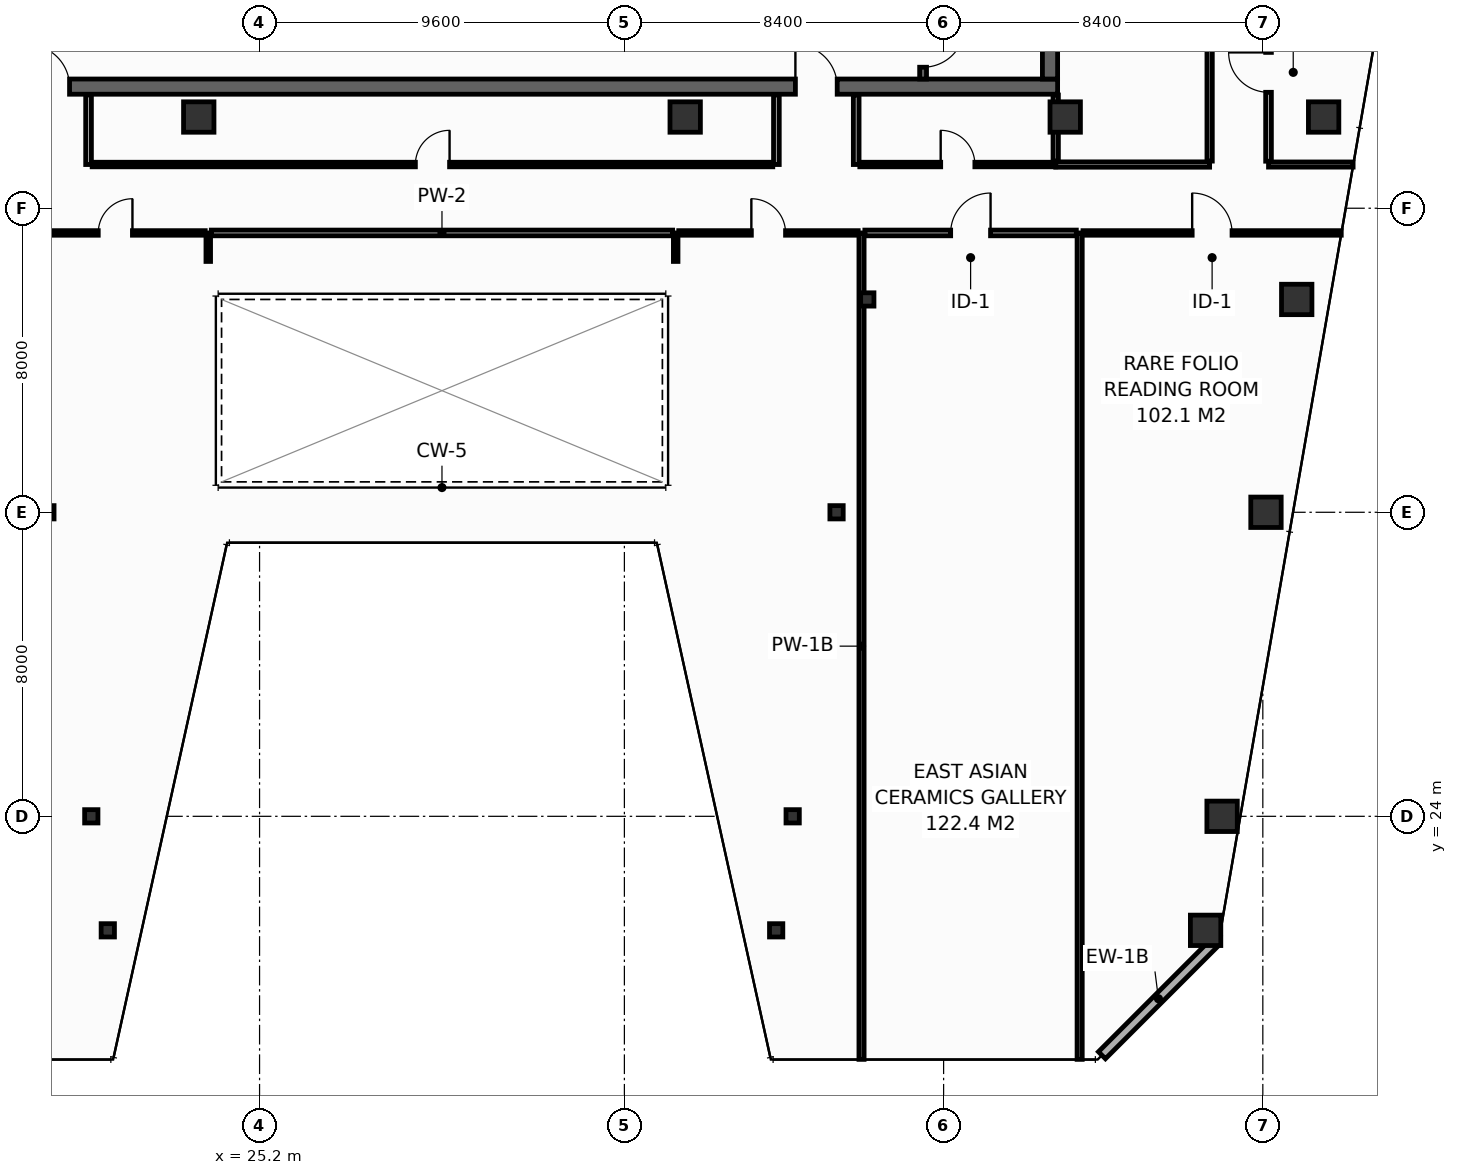
"""IFC4 building model, lengths in metres.
Left out: names, types, materials, properties, quantities, classifications, styles, units other than length and angle.
Written with IfcOpenShell. Run it as: python <this file> out.ifc"""

import sys

from ifc_helpers import new_model, si_unit, direction, frame, frame_2d, origin, origin_2d, place, context, subcontext, project, spatial, rectangle, hollow_rectangle, extrude, element, fill, save


model = new_model("IFC4")
c1 = context("Model", 3, precision=1e-05, world=origin(), true_north=direction((0.0, 1.0)))
c2 = subcontext(c1, "Body", "Model", "MODEL_VIEW")
j1 = project(units=[si_unit("LENGTHUNIT", "METRE"), si_unit("PLANEANGLEUNIT", "RADIAN")], contexts=[c1])
p1 = place(None, origin())
s1 = spatial("IfcSite", under=j1, at=p1, CompositionType="ELEMENT")
p2 = place(p1, origin())
s2 = spatial("IfcBuilding", under=s1, at=p2, CompositionType="ELEMENT")
p3 = place(p2, frame((0.0, 0.0, 242.0)))
s3 = spatial("IfcBuildingStorey", under=s2, at=p3, CompositionType="ELEMENT", Elevation=242.0)
p4 = place(p3, frame((13.7, 43.2, 0.0), z_axis=(0.0, 0.0, 1.0), x_axis=(1.0, 0.0, 0.0)))
e1 = element("IfcWall", 1, at=p4, inside=s3, PredefinedType="SHEAR", context=c2, shape_type="SweptSolid", body=[
    extrude(rectangle(XDim=32.5, YDim=0.4, at=frame_2d((16.25, 0.0))), origin(), (0.0, 0.0, 1.0), 3.55),
])
p5 = place(p4, frame((5.4, 0.0, 0.0)))
e2 = element("IfcOpeningElement", 2, at=p5, cuts=e1, PredefinedType="OPENING", context=c2, shape_type="SweptSolid", body=[
    extrude(rectangle(XDim=1.1, YDim=2.15, at=frame_2d((0.55, 1.075))), frame((0.0, 0.21, 0.0), z_axis=(0.0, -1.0, 0.0), x_axis=(1.0, 0.0, 0.0)), (0.0, 0.0, 1.0), 0.42),
])
p6 = place(p4, frame((25.6, 0.0, 0.0)))
e3 = element("IfcOpeningElement", 3, at=p6, cuts=e1, PredefinedType="OPENING", context=c2, shape_type="SweptSolid", body=[
    extrude(rectangle(XDim=1.1, YDim=2.15, at=frame_2d((0.55, 1.075))), frame((0.0, 0.21, 0.0), z_axis=(0.0, -1.0, 0.0), x_axis=(1.0, 0.0, 0.0)), (0.0, 0.0, 1.0), 0.42),
])
p7 = place(p3, frame((46.0, 43.4, 0.0), z_axis=(0.0, 0.0, 1.0), x_axis=(0.0, 1.0, 0.0)))
e4 = element("IfcWall", 4, at=p7, inside=s3, PredefinedType="SHEAR", context=c2, shape_type="SweptSolid", body=[
    extrude(rectangle(XDim=10.4, YDim=0.4, at=frame_2d((5.2, 0.0))), origin(), (0.0, 0.0, 1.0), 3.55),
])
for number, where, z_axis, x_axis in (
    (5, (23.6, 42.4, 0.0), (0.0, 0.0, 1.0), (1.0, 0.0, 0.0)),
    (6, (36.4, 42.4, 0.0), (0.0, 0.0, 1.0), (1.0, 0.0, 0.0)),
    (7, (46.4, 42.4, 0.0), (0.0, 0.0, 1.0), (1.0, 0.0, 0.0)),
    (8, (53.2, 42.4, 0.0), (0.0, 0.0, 1.0), (1.0, 0.0, 0.0)),
    (9, (50.094, 21.0, 0.0), (0.0, 0.0, 1.0), (1.0, 0.0, 0.0)),
):
    element("IfcColumn", number, at=place(p3, frame(where, z_axis=z_axis, x_axis=x_axis)), inside=s3, PredefinedType="COLUMN", context=c2, shape_type="SweptSolid", body=[
        extrude(hollow_rectangle(XDim=0.8, YDim=0.8, WallThickness=0.036, at=origin_2d()), origin(), (0.0, 0.0, 1.0), 3.8),
    ])
for number, where, z_axis, x_axis in (
    (10, (21.206, 21.0, 0.0), (0.0, 0.0, 1.0), (1.0, 0.0, 0.0)),
    (11, (38.794, 21.0, 0.0), (0.0, 0.0, 1.0), (1.0, 0.0, 0.0)),
):
    element("IfcColumn", number, at=place(p3, frame(where, z_axis=z_axis, x_axis=x_axis)), inside=s3, PredefinedType="COLUMN", context=c2, shape_type="SweptSolid", body=[
        extrude(hollow_rectangle(XDim=0.35, YDim=0.35, WallThickness=0.016, at=origin_2d()), origin(), (0.0, 0.0, 1.0), 3.8),
    ])
p8 = place(p3, frame((50.528, 24.0, 0.0), z_axis=(0.0, 0.0, 1.0), x_axis=(1.0, 0.0, 0.0)))
e12 = element("IfcColumn", 12, at=p8, inside=s3, PredefinedType="COLUMN", context=c2, shape_type="SweptSolid", body=[
    extrude(hollow_rectangle(XDim=0.8, YDim=0.8, WallThickness=0.036, at=origin_2d()), origin(), (0.0, 0.0, 1.0), 3.8),
])
for number, where, z_axis, x_axis in (
    (13, (20.772, 24.0, 0.0), (0.0, 0.0, 1.0), (1.0, 0.0, 0.0)),
    (14, (39.228, 24.0, 0.0), (0.0, 0.0, 1.0), (1.0, 0.0, 0.0)),
):
    element("IfcColumn", number, at=place(p3, frame(where, z_axis=z_axis, x_axis=x_axis)), inside=s3, PredefinedType="COLUMN", context=c2, shape_type="SweptSolid", body=[
        extrude(hollow_rectangle(XDim=0.35, YDim=0.35, WallThickness=0.016, at=origin_2d()), origin(), (0.0, 0.0, 1.0), 3.8),
    ])
p9 = place(p3, frame((51.683, 32.0, 0.0), z_axis=(0.0, 0.0, 1.0), x_axis=(1.0, 0.0, 0.0)))
e15 = element("IfcColumn", 15, at=p9, inside=s3, PredefinedType="COLUMN", context=c2, shape_type="SweptSolid", body=[
    extrude(hollow_rectangle(XDim=0.8, YDim=0.8, WallThickness=0.036, at=origin_2d()), origin(), (0.0, 0.0, 1.0), 3.8),
])
for number, where, z_axis, x_axis in (
    (16, (19.617, 32.0, 0.0), (0.0, 0.0, 1.0), (1.0, 0.0, 0.0)),
    (17, (40.383, 32.0, 0.0), (0.0, 0.0, 1.0), (1.0, 0.0, 0.0)),
):
    element("IfcColumn", number, at=place(p3, frame(where, z_axis=z_axis, x_axis=x_axis)), inside=s3, PredefinedType="COLUMN", context=c2, shape_type="SweptSolid", body=[
        extrude(hollow_rectangle(XDim=0.35, YDim=0.35, WallThickness=0.016, at=origin_2d()), origin(), (0.0, 0.0, 1.0), 3.8),
    ])
p10 = place(p3, frame((52.492, 37.6, 0.0), z_axis=(0.0, 0.0, 1.0), x_axis=(1.0, 0.0, 0.0)))
e18 = element("IfcColumn", 18, at=p10, inside=s3, PredefinedType="COLUMN", context=c2, shape_type="SweptSolid", body=[
    extrude(hollow_rectangle(XDim=0.8, YDim=0.8, WallThickness=0.036, at=origin_2d()), origin(), (0.0, 0.0, 1.0), 3.8),
])
p11 = place(p3, frame((41.192, 37.6, 0.0), z_axis=(0.0, 0.0, 1.0), x_axis=(1.0, 0.0, 0.0)))
e19 = element("IfcColumn", 19, at=p11, inside=s3, PredefinedType="COLUMN", context=c2, shape_type="SweptSolid", body=[
    extrude(hollow_rectangle(XDim=0.35, YDim=0.35, WallThickness=0.016, at=origin_2d()), origin(), (0.0, 0.0, 1.0), 3.8),
])
p12 = place(p3, frame((42.66, 53.8, 0.0), z_axis=(0.0, 0.0, 1.0), x_axis=(0.0, -1.0, 0.0)))
e20 = element("IfcWall", 20, at=p12, inside=s3, PredefinedType="SHEAR", context=c2, shape_type="SweptSolid", body=[
    extrude(rectangle(XDim=10.4, YDim=0.18, at=frame_2d((5.2, 0.0))), origin(), (0.0, 0.0, 1.0), 3.55),
])
p13 = place(p12, frame((8.99, 0.0, 0.0)))
e21 = element("IfcOpeningElement", 21, at=p13, cuts=e20, PredefinedType="OPENING", context=c2, shape_type="SweptSolid", body=[
    extrude(rectangle(XDim=1.1, YDim=2.15, at=frame_2d((0.55, 1.075))), frame((0.0, 0.1, 0.0), z_axis=(0.0, -1.0, 0.0), x_axis=(1.0, 0.0, 0.0)), (0.0, 0.0, 1.0), 0.2),
])
p14 = place(p3, frame((47.366, 17.713, 0.0), z_axis=(0.0, 0.0, 1.0), x_axis=(0.70707775441, 0.707135806771, 0.0)))
e22 = element("IfcWall", 22, at=p14, inside=s3, PredefinedType="STANDARD", context=c2, shape_type="SweptSolid", body=[
    extrude(rectangle(XDim=4.206, YDim=0.26, at=frame_2d((2.103, 0.0))), origin(), (0.0, 0.0, 1.0), 3.55),
])
p15 = place(p3, frame((46.15, 41.15, 0.0), z_axis=(0.0, 0.0, 1.0), x_axis=(1.0, 0.0, 0.0)))
e23 = element("IfcWall", 23, at=p15, inside=s3, PredefinedType="PARTITIONING", context=c2, shape_type="SweptSolid", body=[
    extrude(rectangle(XDim=4.05, YDim=0.14, at=frame_2d((2.025, 0.0))), origin(), (0.0, 0.0, 1.0), 3.55),
])
p16 = place(p3, frame((46.15, 41.24, 0.0), z_axis=(0.0, 0.0, 1.0), x_axis=(0.0, 1.0, 0.0)))
e24 = element("IfcWall", 24, at=p16, inside=s3, PredefinedType="PARTITIONING", context=c2, shape_type="SweptSolid", body=[
    extrude(rectangle(XDim=1.74, YDim=0.14, at=frame_2d((0.87, 0.0))), origin(), (0.0, 0.0, 1.0), 3.55),
])
p17 = place(p3, frame((50.2, 41.24, 0.0), z_axis=(0.0, 0.0, 1.0), x_axis=(0.0, 1.0, 0.0)))
e25 = element("IfcWall", 25, at=p17, inside=s3, PredefinedType="PARTITIONING", context=c2, shape_type="SweptSolid", body=[
    extrude(rectangle(XDim=6.87, YDim=0.14, at=frame_2d((3.435, 0.0))), origin(), (0.0, 0.0, 1.0), 2.947),
])
p18 = place(p17, frame((2.985, 0.0, 0.0)))
e26 = element("IfcOpeningElement", 26, at=p18, cuts=e25, PredefinedType="OPENING", context=c2, shape_type="SweptSolid", body=[
    extrude(rectangle(XDim=0.9, YDim=2.1, at=frame_2d((0.45, 1.05))), frame((0.0, 0.08, 0.0), z_axis=(0.0, -1.0, 0.0), x_axis=(1.0, 0.0, 0.0)), (0.0, 0.0, 1.0), 0.16),
])
p19 = place(p3, frame((51.75, 41.15, 0.0), z_axis=(0.0, 0.0, 1.0), x_axis=(1.0, 0.0, 0.0)))
e27 = element("IfcWall", 27, at=p19, inside=s3, PredefinedType="PARTITIONING", context=c2, shape_type="SweptSolid", body=[
    extrude(rectangle(XDim=2.226, YDim=0.135, at=frame_2d((1.113, 0.0))), origin(), (0.0, 0.0, 1.0), 3.085),
])
p20 = place(p3, frame((51.75, 41.238, 0.0), z_axis=(0.0, 0.0, 1.0), x_axis=(0.0, 1.0, 0.0)))
e28 = element("IfcWall", 28, at=p20, inside=s3, PredefinedType="PARTITIONING", context=c2, shape_type="SweptSolid", body=[
    extrude(rectangle(XDim=4.675, YDim=0.15, at=frame_2d((2.337, 0.0))), origin(), (0.0, 0.0, 1.0), 2.947),
])
p21 = place(p20, frame((1.813, 0.0, 0.0)))
e29 = element("IfcOpeningElement", 29, at=p21, cuts=e28, PredefinedType="OPENING", context=c2, shape_type="SweptSolid", body=[
    extrude(rectangle(XDim=1.05, YDim=2.15, at=frame_2d((0.525, 1.075))), frame((0.0, 0.085, 0.0), z_axis=(0.0, -1.0, 0.0), x_axis=(1.0, 0.0, 0.0)), (0.0, 0.0, 1.0), 0.17),
])
for number, where, z_axis, x_axis in (
    (30, (20.7, 41.15, 0.0), (0.0, 0.0, 1.0), (0.0, 1.0, 0.0)),
    (31, (38.8, 41.15, 0.0), (0.0, 0.0, 1.0), (0.0, 1.0, 0.0)),
    (32, (40.9, 41.15, 0.0), (0.0, 0.0, 1.0), (0.0, 1.0, 0.0)),
):
    element("IfcWall", number, at=place(p3, frame(where, z_axis=z_axis, x_axis=x_axis)), inside=s3, PredefinedType="PARTITIONING", context=c2, shape_type="SweptSolid", body=[
        extrude(rectangle(XDim=1.83, YDim=0.15, at=frame_2d((0.915, 0.0))), origin(), (0.0, 0.0, 1.0), 3.55),
    ])
p22 = place(p3, frame((20.795, 41.15, 0.0), z_axis=(0.0, 0.0, 1.0), x_axis=(1.0, 0.0, 0.0)))
e33 = element("IfcWall", 33, at=p22, inside=s3, PredefinedType="PARTITIONING", context=c2, shape_type="SweptSolid", body=[
    extrude(rectangle(XDim=17.91, YDim=0.12, at=frame_2d((8.955, 0.0))), origin(), (0.0, 0.0, 1.0), 2.947),
])
p23 = place(p22, frame((8.505, 0.0, 0.0)))
e34 = element("IfcOpeningElement", 34, at=p23, cuts=e33, PredefinedType="OPENING", context=c2, shape_type="SweptSolid", body=[
    extrude(rectangle(XDim=0.9, YDim=2.1, at=frame_2d((0.45, 1.05))), frame((0.0, 0.07, 0.0), z_axis=(0.0, -1.0, 0.0), x_axis=(1.0, 0.0, 0.0)), (0.0, 0.0, 1.0), 0.14),
])
p24 = place(p3, frame((40.995, 41.15, 0.0), z_axis=(0.0, 0.0, 1.0), x_axis=(1.0, 0.0, 0.0)))
e35 = element("IfcWall", 35, at=p24, inside=s3, PredefinedType="PARTITIONING", context=c2, shape_type="SweptSolid", body=[
    extrude(rectangle(XDim=5.155, YDim=0.12, at=frame_2d((2.577, 0.0))), origin(), (0.0, 0.0, 1.0), 3.55),
])
p25 = place(p24, frame((2.128, 0.0, 0.0)))
e36 = element("IfcOpeningElement", 36, at=p25, cuts=e35, PredefinedType="OPENING", context=c2, shape_type="SweptSolid", body=[
    extrude(rectangle(XDim=0.9, YDim=2.1, at=frame_2d((0.45, 1.05))), frame((0.0, 0.07, 0.0), z_axis=(0.0, -1.0, 0.0), x_axis=(1.0, 0.0, 0.0)), (0.0, 0.0, 1.0), 0.14),
])
for number, where, z_axis, x_axis in (
    (37, (41.04, 17.605, 0.0), (0.0, 0.0, 1.0), (0.0, 1.0, 0.0)),
    (38, (46.78, 17.605, 0.0), (0.0, 0.0, 1.0), (0.0, 1.0, 0.0)),
):
    element("IfcWall", number, at=place(p3, frame(where, z_axis=z_axis, x_axis=x_axis)), inside=s3, PredefinedType="PARTITIONING", context=c2, shape_type="SweptSolid", body=[
        extrude(rectangle(XDim=21.745, YDim=0.135, at=frame_2d((10.873, 0.0))), origin(), (0.0, 0.0, 1.0), 2.947),
    ])
for number, where, z_axis, x_axis in (
    (39, (23.85, 38.6, 0.0), (0.0, 0.0, 1.0), (0.0, 1.0, 0.0)),
    (40, (36.15, 38.6, 0.0), (0.0, 0.0, 1.0), (0.0, 1.0, 0.0)),
):
    element("IfcWall", number, at=place(p3, frame(where, z_axis=z_axis, x_axis=x_axis)), inside=s3, PredefinedType="PARTITIONING", context=c2, shape_type="SweptSolid", body=[
        extrude(rectangle(XDim=0.75, YDim=0.12, at=frame_2d((0.375, 0.0))), origin(), (0.0, 0.0, 1.0), 3.55),
    ])
p26 = place(p3, frame((19.04, 39.35, 0.0), z_axis=(0.0, 0.0, 1.0), x_axis=(1.0, 0.0, 0.0)))
e41 = element("IfcWall", 41, at=p26, inside=s3, PredefinedType="PARTITIONING", context=c2, shape_type="SweptSolid", body=[
    extrude(rectangle(XDim=4.73, YDim=0.12, at=frame_2d((2.365, 0.0))), origin(), (0.0, 0.0, 1.0), 2.947),
])
p27 = place(p26, frame((1.915, 0.0, 0.0)))
e42 = element("IfcOpeningElement", 42, at=p27, cuts=e41, PredefinedType="OPENING", context=c2, shape_type="SweptSolid", body=[
    extrude(rectangle(XDim=0.9, YDim=2.1, at=frame_2d((0.45, 1.05))), frame((0.0, 0.07, 0.0), z_axis=(0.0, -1.0, 0.0), x_axis=(1.0, 0.0, 0.0)), (0.0, 0.0, 1.0), 0.14),
])
p28 = place(p3, frame((23.93, 39.35, 0.0), z_axis=(0.0, 0.0, 1.0), x_axis=(1.0, 0.0, 0.0)))
e43 = element("IfcWall", 43, at=p28, inside=s3, PredefinedType="PARTITIONING", context=c2, shape_type="SweptSolid", body=[
    extrude(rectangle(XDim=12.14, YDim=0.15, at=frame_2d((6.07, 0.0))), origin(), (0.0, 0.0, 1.0), 3.55),
])
p29 = place(p3, frame((36.23, 39.35, 0.0), z_axis=(0.0, 0.0, 1.0), x_axis=(1.0, 0.0, 0.0)))
e44 = element("IfcWall", 44, at=p29, inside=s3, PredefinedType="PARTITIONING", context=c2, shape_type="SweptSolid", body=[
    extrude(rectangle(XDim=4.722, YDim=0.12, at=frame_2d((2.361, 0.0))), origin(), (0.0, 0.0, 1.0), 2.947),
])
p30 = place(p29, frame((1.911, 0.0, 0.0)))
e45 = element("IfcOpeningElement", 45, at=p30, cuts=e44, PredefinedType="OPENING", context=c2, shape_type="SweptSolid", body=[
    extrude(rectangle(XDim=0.9, YDim=2.1, at=frame_2d((0.45, 1.05))), frame((0.0, 0.07, 0.0), z_axis=(0.0, -1.0, 0.0), x_axis=(1.0, 0.0, 0.0)), (0.0, 0.0, 1.0), 0.14),
])
p31 = place(p3, frame((41.127, 39.35, 0.0), z_axis=(0.0, 0.0, 1.0), x_axis=(1.0, 0.0, 0.0)))
e46 = element("IfcWall", 46, at=p31, inside=s3, PredefinedType="PARTITIONING", context=c2, shape_type="SweptSolid", body=[
    extrude(rectangle(XDim=5.565, YDim=0.15, at=frame_2d((2.782, 0.0))), origin(), (0.0, 0.0, 1.0), 3.55),
])
p32 = place(p31, frame((2.258, 0.0, 0.0)))
e47 = element("IfcOpeningElement", 47, at=p32, cuts=e46, PredefinedType="OPENING", context=c2, shape_type="SweptSolid", body=[
    extrude(rectangle(XDim=1.05, YDim=2.15, at=frame_2d((0.525, 1.075))), frame((0.0, 0.085, 0.0), z_axis=(0.0, -1.0, 0.0), x_axis=(1.0, 0.0, 0.0)), (0.0, 0.0, 1.0), 0.17),
])
p33 = place(p3, frame((46.867, 39.35, 0.0), z_axis=(0.0, 0.0, 1.0), x_axis=(1.0, 0.0, 0.0)))
e48 = element("IfcWall", 48, at=p33, inside=s3, PredefinedType="PARTITIONING", context=c2, shape_type="SweptSolid", body=[
    extrude(rectangle(XDim=6.796, YDim=0.12, at=frame_2d((3.398, 0.0))), origin(), (0.0, 0.0, 1.0), 3.085),
])
p34 = place(p33, frame((2.873, 0.0, 0.0)))
e49 = element("IfcOpeningElement", 49, at=p34, cuts=e48, PredefinedType="OPENING", context=c2, shape_type="SweptSolid", body=[
    extrude(rectangle(XDim=1.05, YDim=2.15, at=frame_2d((0.525, 1.075))), frame((0.0, 0.07, 0.0), z_axis=(0.0, -1.0, 0.0), x_axis=(1.0, 0.0, 0.0)), (0.0, 0.0, 1.0), 0.14),
])
p35 = place(p13, origin())
e50 = element("IfcDoor", 50, at=p35, inside=s3, OperationType="SINGLE_SWING_LEFT", PredefinedType="DOOR", context=c2, shape_type="SweptSolid", body=[
    extrude(rectangle(XDim=1.1, YDim=2.15, at=frame_2d((0.55, 1.075))), frame((0.0, 0.025, 0.0), z_axis=(0.0, -1.0, 0.0), x_axis=(1.0, 0.0, 0.0)), (0.0, 0.0, 1.0), 0.05),
])
fill(e21, e50)
p36 = place(p5, origin())
e51 = element("IfcDoor", 51, at=p36, inside=s3, OperationType="SINGLE_SWING_LEFT", PredefinedType="DOOR", context=c2, shape_type="SweptSolid", body=[
    extrude(rectangle(XDim=1.1, YDim=2.15, at=frame_2d((0.55, 1.075))), frame((0.0, 0.025, 0.0), z_axis=(0.0, -1.0, 0.0), x_axis=(1.0, 0.0, 0.0)), (0.0, 0.0, 1.0), 0.05),
])
fill(e2, e51)
p37 = place(p6, origin())
e52 = element("IfcDoor", 52, at=p37, inside=s3, OperationType="SINGLE_SWING_LEFT", PredefinedType="DOOR", context=c2, shape_type="SweptSolid", body=[
    extrude(rectangle(XDim=1.1, YDim=2.15, at=frame_2d((0.55, 1.075))), frame((0.0, 0.025, 0.0), z_axis=(0.0, -1.0, 0.0), x_axis=(1.0, 0.0, 0.0)), (0.0, 0.0, 1.0), 0.05),
])
fill(e3, e52)
p38 = place(p21, origin())
e53 = element("IfcDoor", 53, at=p38, inside=s3, OperationType="SINGLE_SWING_RIGHT", PredefinedType="DOOR", context=c2, shape_type="SweptSolid", body=[
    extrude(rectangle(XDim=1.05, YDim=2.15, at=frame_2d((0.525, 1.075))), frame((0.0, 0.025, 0.0), z_axis=(0.0, -1.0, 0.0), x_axis=(1.0, 0.0, 0.0)), (0.0, 0.0, 1.0), 0.05),
])
fill(e29, e53)
p39 = place(p23, origin())
e54 = element("IfcDoor", 54, at=p39, inside=s3, OperationType="SINGLE_SWING_RIGHT", PredefinedType="DOOR", context=c2, shape_type="SweptSolid", body=[
    extrude(rectangle(XDim=0.9, YDim=2.1, at=frame_2d((0.45, 1.05))), frame((0.0, 0.025, 0.0), z_axis=(0.0, -1.0, 0.0), x_axis=(1.0, 0.0, 0.0)), (0.0, 0.0, 1.0), 0.05),
])
fill(e34, e54)
p40 = place(p25, origin())
e55 = element("IfcDoor", 55, at=p40, inside=s3, OperationType="SINGLE_SWING_LEFT", PredefinedType="DOOR", context=c2, shape_type="SweptSolid", body=[
    extrude(rectangle(XDim=0.9, YDim=2.1, at=frame_2d((0.45, 1.05))), frame((0.0, 0.025, 0.0), z_axis=(0.0, -1.0, 0.0), x_axis=(1.0, 0.0, 0.0)), (0.0, 0.0, 1.0), 0.05),
])
fill(e36, e55)
p41 = place(p27, origin())
e56 = element("IfcDoor", 56, at=p41, inside=s3, OperationType="SINGLE_SWING_RIGHT", PredefinedType="DOOR", context=c2, shape_type="SweptSolid", body=[
    extrude(rectangle(XDim=0.9, YDim=2.1, at=frame_2d((0.45, 1.05))), frame((0.0, 0.025, 0.0), z_axis=(0.0, -1.0, 0.0), x_axis=(1.0, 0.0, 0.0)), (0.0, 0.0, 1.0), 0.05),
])
fill(e42, e56)
p42 = place(p30, origin())
e57 = element("IfcDoor", 57, at=p42, inside=s3, OperationType="SINGLE_SWING_LEFT", PredefinedType="DOOR", context=c2, shape_type="SweptSolid", body=[
    extrude(rectangle(XDim=0.9, YDim=2.1, at=frame_2d((0.45, 1.05))), frame((0.0, 0.025, 0.0), z_axis=(0.0, -1.0, 0.0), x_axis=(1.0, 0.0, 0.0)), (0.0, 0.0, 1.0), 0.05),
])
fill(e45, e57)
p43 = place(p32, origin())
e58 = element("IfcDoor", 58, at=p43, inside=s3, OperationType="SINGLE_SWING_RIGHT", PredefinedType="DOOR", context=c2, shape_type="SweptSolid", body=[
    extrude(rectangle(XDim=1.05, YDim=2.15, at=frame_2d((0.525, 1.075))), frame((0.0, 0.025, 0.0), z_axis=(0.0, -1.0, 0.0), x_axis=(1.0, 0.0, 0.0)), (0.0, 0.0, 1.0), 0.05),
])
fill(e47, e58)
p44 = place(p34, origin())
e59 = element("IfcDoor", 59, at=p44, inside=s3, OperationType="SINGLE_SWING_LEFT", PredefinedType="DOOR", context=c2, shape_type="SweptSolid", body=[
    extrude(rectangle(XDim=1.05, YDim=2.15, at=frame_2d((0.525, 1.075))), frame((0.0, 0.025, 0.0), z_axis=(0.0, -1.0, 0.0), x_axis=(1.0, 0.0, 0.0)), (0.0, 0.0, 1.0), 0.05),
])
fill(e49, e59)
save(model, sys.argv[1])
